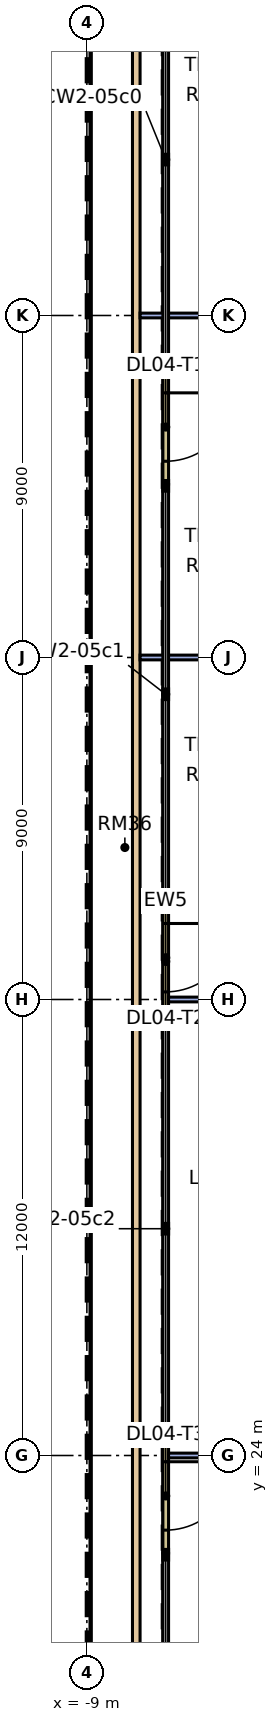
"""IFC4 building model, lengths in metres.
Left out: names, types, materials, properties, quantities, classifications, styles, units other than length and angle.
Written with IfcOpenShell. Run it as: python <this file> out.ifc"""

import sys

from ifc_helpers import new_model, si_unit, direction, frame, frame_2d, origin, place, context, subcontext, project, spatial, rectangle, extrude, element, fill, save


model = new_model("IFC4")
c1 = context("Model", 3, precision=1e-05, world=origin(), true_north=direction((0.0, 1.0)))
c2 = subcontext(c1, "Body", "Model", "MODEL_VIEW")
j1 = project(units=[si_unit("LENGTHUNIT", "METRE"), si_unit("PLANEANGLEUNIT", "RADIAN")], contexts=[c1])
p1 = place(None, origin())
s1 = spatial("IfcSite", under=j1, at=p1, CompositionType="ELEMENT")
p2 = place(p1, origin())
s2 = spatial("IfcBuilding", under=s1, at=p2, CompositionType="ELEMENT")
p3 = place(p2, frame((0.0, 0.0, 21.6)))
s3 = spatial("IfcBuildingStorey", under=s2, at=p3, CompositionType="ELEMENT", Elevation=21.6)
p4 = place(p3, frame((-6.925, 52.564, 0.0), z_axis=(0.0, 0.0, 1.0), x_axis=(0.0, -1.0, 0.0)))
e1 = element("IfcWall", 1, at=p4, inside=s3, PredefinedType="SOLIDWALL", context=c2, shape_type="SweptSolid", body=[
    extrude(rectangle(XDim=3.0, YDim=0.15, at=frame_2d((1.5, 0.0))), origin(), (0.0, 0.0, 1.0), 4.4),
])
p5 = place(p4, frame((0.6, 0.0, 0.0)))
e2 = element("IfcOpeningElement", 2, at=p5, cuts=e1, PredefinedType="OPENING", context=c2, shape_type="SweptSolid", body=[
    extrude(rectangle(XDim=1.8, YDim=2.4, at=frame_2d((0.9, 1.2))), frame((0.0, 0.085, 0.0), z_axis=(0.0, -1.0, 0.0), x_axis=(1.0, 0.0, 0.0)), (0.0, 0.0, 1.0), 0.17),
])
p6 = place(p3, frame((-6.925, 38.5, 0.0), z_axis=(0.0, 0.0, 1.0), x_axis=(0.0, -1.0, 0.0)))
e3 = element("IfcWall", 3, at=p6, inside=s3, PredefinedType="SOLIDWALL", context=c2, shape_type="SweptSolid", body=[
    extrude(rectangle(XDim=3.0, YDim=0.15, at=frame_2d((1.5, 0.0))), origin(), (0.0, 0.0, 1.0), 4.4),
])
p7 = place(p6, frame((0.5, 0.0, 0.0)))
e4 = element("IfcOpeningElement", 4, at=p7, cuts=e3, PredefinedType="OPENING", context=c2, shape_type="SweptSolid", body=[
    extrude(rectangle(XDim=1.8, YDim=2.4, at=frame_2d((0.9, 1.2))), frame((0.0, 0.085, 0.0), z_axis=(0.0, -1.0, 0.0), x_axis=(1.0, 0.0, 0.0)), (0.0, 0.0, 1.0), 0.17),
])
p8 = place(p3, frame((-6.925, 24.436, 0.0), z_axis=(0.0, 0.0, 1.0), x_axis=(0.0, -1.0, 0.0)))
e5 = element("IfcWall", 5, at=p8, inside=s3, PredefinedType="SOLIDWALL", context=c2, shape_type="SweptSolid", body=[
    extrude(rectangle(XDim=3.0, YDim=0.15, at=frame_2d((1.5, 0.0))), origin(), (0.0, 0.0, 1.0), 4.4),
])
p9 = place(p8, frame((0.6, 0.0, 0.0)))
e6 = element("IfcOpeningElement", 6, at=p9, cuts=e5, PredefinedType="OPENING", context=c2, shape_type="SweptSolid", body=[
    extrude(rectangle(XDim=1.8, YDim=2.4, at=frame_2d((0.9, 1.2))), frame((0.0, 0.085, 0.0), z_axis=(0.0, -1.0, 0.0), x_axis=(1.0, 0.0, 0.0)), (0.0, 0.0, 1.0), 0.17),
])
p10 = place(p3, frame((-7.7, 9.932, 0.0), z_axis=(0.0, 0.0, 1.0), x_axis=(0.0, 1.0, 0.0)))
e7 = element("IfcWall", 7, at=p10, inside=s3, PredefinedType="PARAPET", context=c2, shape_type="SweptSolid", body=[
    extrude(rectangle(XDim=54.136, YDim=0.2, at=frame_2d((27.068, 0.0))), origin(), (0.0, 0.0, 1.0), 0.5),
])
for number, where, z_axis, x_axis in (
    (8, (-7.6, 45.0, 0.0), (0.0, 0.0, 1.0), (1.0, 0.0, 0.0)),
    (9, (-7.6, 54.0, 0.0), (0.0, 0.0, 1.0), (1.0, 0.0, 0.0)),
):
    element("IfcWall", number, at=place(p3, frame(where, z_axis=z_axis, x_axis=x_axis)), inside=s3, PredefinedType="PARTITIONING", context=c2, shape_type="SweptSolid", body=[
        extrude(rectangle(XDim=4.4, YDim=0.125, at=frame_2d((2.2, 0.0))), origin(), (0.0, 0.0, 1.0), 4.4),
    ])
for number, where, z_axis, x_axis in (
    (10, (-6.851, 24.0, 0.0), (0.0, 0.0, 1.0), (1.0, 0.0, 0.0)),
    (11, (-6.851, 36.0, 0.0), (0.0, 0.0, 1.0), (1.0, 0.0, 0.0)),
):
    element("IfcWall", number, at=place(p3, frame(where, z_axis=z_axis, x_axis=x_axis)), inside=s3, PredefinedType="PARTITIONING", context=c2, shape_type="SweptSolid", body=[
        extrude(rectangle(XDim=3.651, YDim=0.125, at=frame_2d((1.826, 0.0))), origin(), (0.0, 0.0, 1.0), 4.4),
    ])
p11 = place(p5, origin())
e12 = element("IfcDoor", 12, at=p11, inside=s3, OperationType="DOUBLE_DOOR_SINGLE_SWING", PredefinedType="DOOR", context=c2, shape_type="SweptSolid", body=[
    extrude(rectangle(XDim=1.8, YDim=2.4, at=frame_2d((0.9, 1.2))), frame((0.0, 0.025, 0.0), z_axis=(0.0, -1.0, 0.0), x_axis=(1.0, 0.0, 0.0)), (0.0, 0.0, 1.0), 0.05),
])
fill(e2, e12)
p12 = place(p7, origin())
e13 = element("IfcDoor", 13, at=p12, inside=s3, OperationType="DOUBLE_DOOR_SINGLE_SWING", PredefinedType="DOOR", context=c2, shape_type="SweptSolid", body=[
    extrude(rectangle(XDim=1.8, YDim=2.4, at=frame_2d((0.9, 1.2))), frame((0.0, 0.025, 0.0), z_axis=(0.0, -1.0, 0.0), x_axis=(1.0, 0.0, 0.0)), (0.0, 0.0, 1.0), 0.05),
])
fill(e4, e13)
p13 = place(p9, origin())
e14 = element("IfcDoor", 14, at=p13, inside=s3, OperationType="DOUBLE_DOOR_SINGLE_SWING", PredefinedType="DOOR", context=c2, shape_type="SweptSolid", body=[
    extrude(rectangle(XDim=1.8, YDim=2.4, at=frame_2d((0.9, 1.2))), frame((0.0, 0.025, 0.0), z_axis=(0.0, -1.0, 0.0), x_axis=(1.0, 0.0, 0.0)), (0.0, 0.0, 1.0), 0.05),
])
fill(e6, e14)
save(model, sys.argv[1])
